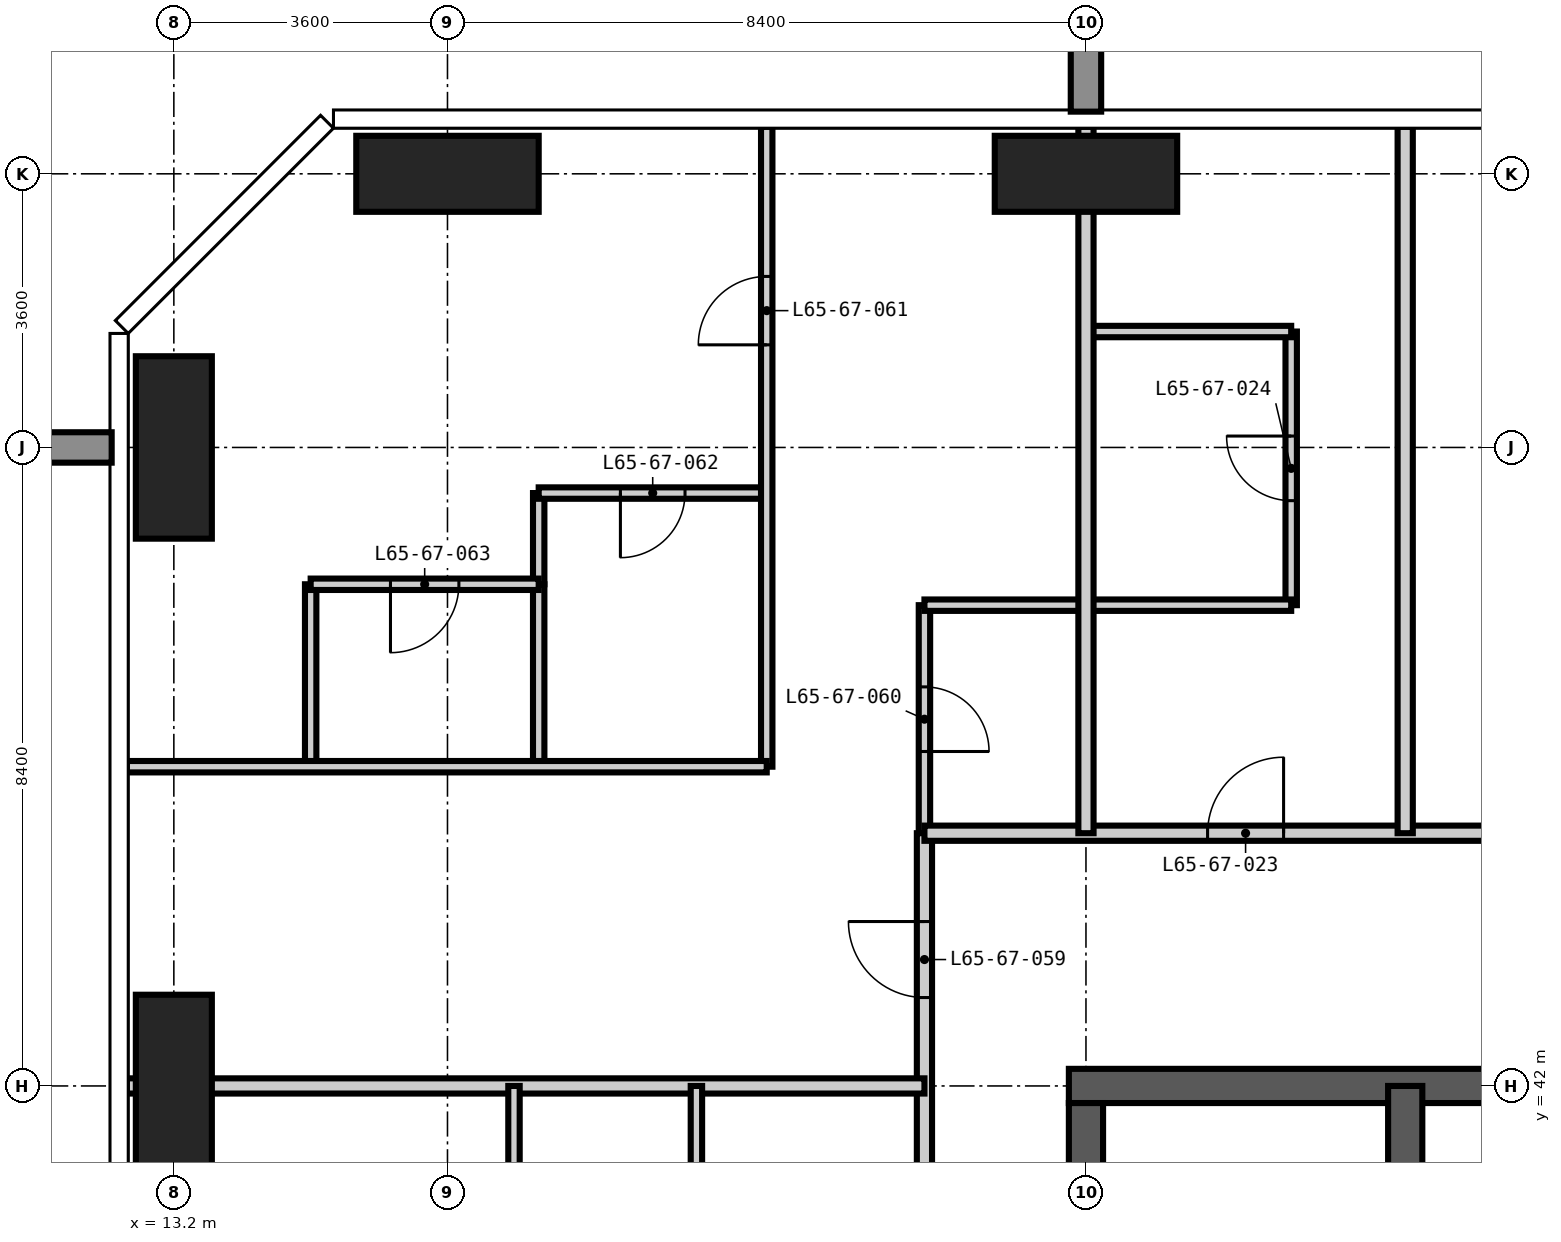
"""IFC4 building model, lengths in metres.
Left out: names, types, materials, properties, quantities, classifications, styles, units other than length and angle.
Written with IfcOpenShell. Run it as: python <this file> out.ifc"""

import sys

from ifc_helpers import new_model, si_unit, direction, frame, frame_2d, origin, origin_2d, place, context, subcontext, project, spatial, rectangle, extrude, element, fill, save


model = new_model("IFC4")
c1 = context("Model", 3, precision=1e-05, world=origin(), true_north=direction((0.0, 1.0)))
c2 = subcontext(c1, "Body", "Model", "MODEL_VIEW")
j1 = project(units=[si_unit("LENGTHUNIT", "METRE"), si_unit("PLANEANGLEUNIT", "RADIAN")], contexts=[c1])
p1 = place(None, origin())
s1 = spatial("IfcSite", under=j1, at=p1, CompositionType="ELEMENT")
p2 = place(p1, origin())
s2 = spatial("IfcBuilding", under=s1, at=p2, CompositionType="ELEMENT")
p3 = place(p2, frame((0.0, 0.0, 252.9)))
s3 = spatial("IfcBuildingStorey", under=s2, at=p3, CompositionType="ELEMENT", Elevation=252.9)
for number, where, z_axis, x_axis in (
    (1, (13.2, 42.0, -0.35), (0.0, 0.0, 1.0), (1.0, 0.0, 0.0)),
    (2, (13.2, 50.4, -0.35), (0.0, 0.0, 1.0), (1.0, 0.0, 0.0)),
):
    element("IfcColumn", number, at=place(p3, frame(where, z_axis=z_axis, x_axis=x_axis)), inside=s3, PredefinedType="COLUMN", context=c2, shape_type="SweptSolid", body=[
        extrude(rectangle(XDim=1.0, YDim=2.4, at=origin_2d()), origin(), (0.0, 0.0, 1.0), 3.9),
    ])
for number, where, z_axis, x_axis in (
    (3, (16.8, 54.0, -0.35), (0.0, 0.0, 1.0), (1.0, 0.0, 0.0)),
    (4, (25.2, 54.0, -0.35), (0.0, 0.0, 1.0), (1.0, 0.0, 0.0)),
):
    element("IfcColumn", number, at=place(p3, frame(where, z_axis=z_axis, x_axis=x_axis)), inside=s3, PredefinedType="COLUMN", context=c2, shape_type="SweptSolid", body=[
        extrude(rectangle(XDim=2.4, YDim=1.0, at=origin_2d()), origin(), (0.0, 0.0, 1.0), 3.9),
    ])
p4 = place(p3, frame((42.225, 42.0, -0.35), z_axis=(0.0, 0.0, 1.0), x_axis=(-1.0, 0.0, 0.0)))
e5 = element("IfcWall", 5, at=p4, inside=s3, PredefinedType="SHEAR", context=c2, shape_type="SweptSolid", body=[
    extrude(rectangle(XDim=17.25, YDim=0.45, at=frame_2d((8.625, 0.0))), origin(), (0.0, 0.0, 1.0), 3.9),
])
p5 = place(p4, frame((10.125, 0.0, 0.35)))
e6 = element("IfcOpeningElement", 6, at=p5, cuts=e5, PredefinedType="OPENING", context=c2, shape_type="SweptSolid", body=[
    extrude(rectangle(XDim=1.2, YDim=2.2, at=frame_2d((0.6, 1.1))), frame((0.0, 0.235, 0.0), z_axis=(0.0, -1.0, 0.0), x_axis=(1.0, 0.0, 0.0)), (0.0, 0.0, 1.0), 0.47),
])
p6 = place(p3, frame((25.2, 41.775, -0.35), z_axis=(0.0, 0.0, 1.0), x_axis=(0.0, -1.0, 0.0)))
e7 = element("IfcWall", 7, at=p6, inside=s3, PredefinedType="SHEAR", context=c2, shape_type="SweptSolid", body=[
    extrude(rectangle(XDim=24.75, YDim=0.45, at=frame_2d((12.375, 0.0))), origin(), (0.0, 0.0, 1.0), 3.9),
])
p7 = place(p6, frame((11.875, 0.0, 0.35)))
e8 = element("IfcOpeningElement", 8, at=p7, cuts=e7, PredefinedType="OPENING", context=c2, shape_type="SweptSolid", body=[
    extrude(rectangle(XDim=1.0, YDim=2.1, at=frame_2d((0.5, 1.05))), frame((0.0, 0.235, 0.0), z_axis=(0.0, -1.0, 0.0), x_axis=(1.0, 0.0, 0.0)), (0.0, 0.0, 1.0), 0.47),
])
p8 = place(p3, frame((29.4, 33.6, -0.35), z_axis=(0.0, 0.0, 1.0), x_axis=(0.0, 1.0, 0.0)))
e9 = element("IfcWall", 9, at=p8, inside=s3, PredefinedType="SHEAR", context=c2, shape_type="SweptSolid", body=[
    extrude(rectangle(XDim=8.4, YDim=0.45, at=frame_2d((4.2, 0.0))), origin(), (0.0, 0.0, 1.0), 3.9),
])
p9 = place(p8, frame((0.525, 0.0, 0.35)))
e10 = element("IfcOpeningElement", 10, at=p9, cuts=e9, PredefinedType="OPENING", context=c2, shape_type="SweptSolid", body=[
    extrude(rectangle(XDim=1.2, YDim=2.2, at=frame_2d((0.6, 1.1))), frame((0.0, 0.235, 0.0), z_axis=(0.0, -1.0, 0.0), x_axis=(1.0, 0.0, 0.0)), (0.0, 0.0, 1.0), 0.47),
])
p10 = place(p3, frame((18.0, 48.6, 0.0), z_axis=(0.0, 0.0, 1.0), x_axis=(0.0, 1.0, 0.0)))
e11 = element("IfcWall", 11, at=p10, inside=s3, PredefinedType="PARTITIONING", context=c2, shape_type="SweptSolid", body=[
    extrude(rectangle(XDim=1.2, YDim=0.15, at=frame_2d((0.6, 0.0))), origin(), (0.0, 0.0, 1.0), 3.55),
])
p11 = place(p3, frame((23.075, 45.325, 0.0), z_axis=(0.0, 0.0, 1.0), x_axis=(0.0, 1.0, 0.0)))
e12 = element("IfcWall", 12, at=p11, inside=s3, PredefinedType="PARTITIONING", context=c2, shape_type="SweptSolid", body=[
    extrude(rectangle(XDim=3.0, YDim=0.15, at=frame_2d((1.5, 0.0))), origin(), (0.0, 0.0, 1.0), 3.55),
])
p12 = place(p11, frame((1.075, 0.0, 0.0)))
e13 = element("IfcOpeningElement", 13, at=p12, cuts=e12, PredefinedType="OPENING", context=c2, shape_type="SweptSolid", body=[
    extrude(rectangle(XDim=0.85, YDim=2.1, at=frame_2d((0.425, 1.05))), frame((0.0, 0.085, 0.0), z_axis=(0.0, -1.0, 0.0), x_axis=(1.0, 0.0, 0.0)), (0.0, 0.0, 1.0), 0.17),
])
p13 = place(p3, frame((27.9, 48.325, 0.0), z_axis=(0.0, 0.0, 1.0), x_axis=(0.0, 1.0, 0.0)))
e14 = element("IfcWall", 14, at=p13, inside=s3, PredefinedType="PARTITIONING", context=c2, shape_type="SweptSolid", body=[
    extrude(rectangle(XDim=3.6, YDim=0.15, at=frame_2d((1.8, 0.0))), origin(), (0.0, 0.0, 1.0), 3.55),
])
p14 = place(p13, frame((1.375, 0.0, 0.0)))
e15 = element("IfcOpeningElement", 15, at=p14, cuts=e14, PredefinedType="OPENING", context=c2, shape_type="SweptSolid", body=[
    extrude(rectangle(XDim=0.85, YDim=2.1, at=frame_2d((0.425, 1.05))), frame((0.0, 0.085, 0.0), z_axis=(0.0, -1.0, 0.0), x_axis=(1.0, 0.0, 0.0)), (0.0, 0.0, 1.0), 0.17),
])
p15 = place(p3, frame((23.075, 48.325, 0.0), z_axis=(0.0, 0.0, 1.0), x_axis=(1.0, 0.0, 0.0)))
e16 = element("IfcWall", 16, at=p15, inside=s3, PredefinedType="PARTITIONING", context=c2, shape_type="SweptSolid", body=[
    extrude(rectangle(XDim=4.825, YDim=0.15, at=frame_2d((2.413, 0.0))), origin(), (0.0, 0.0, 1.0), 3.55),
])
p16 = place(p3, frame((18.0, 49.8, 0.0), z_axis=(0.0, 0.0, 1.0), x_axis=(1.0, 0.0, 0.0)))
e17 = element("IfcWall", 17, at=p16, inside=s3, PredefinedType="PARTITIONING", context=c2, shape_type="SweptSolid", body=[
    extrude(rectangle(XDim=3.0, YDim=0.15, at=frame_2d((1.5, 0.0))), origin(), (0.0, 0.0, 1.0), 3.55),
])
p17 = place(p16, frame((1.075, 0.0, 0.0)))
e18 = element("IfcOpeningElement", 18, at=p17, cuts=e17, PredefinedType="OPENING", context=c2, shape_type="SweptSolid", body=[
    extrude(rectangle(XDim=0.85, YDim=2.1, at=frame_2d((0.425, 1.05))), frame((0.0, 0.085, 0.0), z_axis=(0.0, -1.0, 0.0), x_axis=(1.0, 0.0, 0.0)), (0.0, 0.0, 1.0), 0.17),
])
p18 = place(p3, frame((25.2, 51.925, 0.0), z_axis=(0.0, 0.0, 1.0), x_axis=(1.0, 0.0, 0.0)))
e19 = element("IfcWall", 19, at=p18, inside=s3, PredefinedType="PARTITIONING", context=c2, shape_type="SweptSolid", body=[
    extrude(rectangle(XDim=2.7, YDim=0.15, at=frame_2d((1.35, 0.0))), origin(), (0.0, 0.0, 1.0), 3.55),
])
p19 = place(p3, frame((23.075, 14.675, 0.0), z_axis=(0.0, 0.0, 1.0), x_axis=(0.0, 1.0, 0.0)))
e20 = element("IfcWall", 20, at=p19, inside=s3, PredefinedType="PARTITIONING", context=c2, shape_type="SweptSolid", body=[
    extrude(rectangle(XDim=30.65, YDim=0.2, at=frame_2d((15.325, 0.0))), origin(), (0.0, 0.0, 1.0), 3.55),
])
p20 = place(p19, frame((4.925, 0.0, 0.0)))
e21 = element("IfcOpeningElement", 21, at=p20, cuts=e20, PredefinedType="OPENING", context=c2, shape_type="SweptSolid", body=[
    extrude(rectangle(XDim=1.0, YDim=2.2, at=frame_2d((0.5, 1.1))), frame((0.0, 0.11, 0.0), z_axis=(0.0, -1.0, 0.0), x_axis=(1.0, 0.0, 0.0)), (0.0, 0.0, 1.0), 0.22),
])
p21 = place(p19, frame((15.125, 0.0, 0.0)))
e22 = element("IfcOpeningElement", 22, at=p21, cuts=e20, PredefinedType="OPENING", context=c2, shape_type="SweptSolid", body=[
    extrude(rectangle(XDim=1.0, YDim=2.2, at=frame_2d((0.5, 1.1))), frame((0.0, 0.11, 0.0), z_axis=(0.0, -1.0, 0.0), x_axis=(1.0, 0.0, 0.0)), (0.0, 0.0, 1.0), 0.22),
])
p22 = place(p19, frame((21.725, 0.0, 0.0)))
e23 = element("IfcOpeningElement", 23, at=p22, cuts=e20, PredefinedType="OPENING", context=c2, shape_type="SweptSolid", body=[
    extrude(rectangle(XDim=1.0, YDim=2.2, at=frame_2d((0.5, 1.1))), frame((0.0, 0.11, 0.0), z_axis=(0.0, -1.0, 0.0), x_axis=(1.0, 0.0, 0.0)), (0.0, 0.0, 1.0), 0.22),
])
p23 = place(p19, frame((0.563, 0.0, 0.0)))
e24 = element("IfcOpeningElement", 24, at=p23, cuts=e20, PredefinedType="OPENING", context=c2, shape_type="SweptSolid", body=[
    extrude(rectangle(XDim=1.0, YDim=2.2, at=frame_2d((0.5, 1.1))), frame((0.0, 0.11, 0.0), z_axis=(0.0, -1.0, 0.0), x_axis=(1.0, 0.0, 0.0)), (0.0, 0.0, 1.0), 0.22),
])
p24 = place(p19, frame((28.488, 0.0, 0.0)))
e25 = element("IfcOpeningElement", 25, at=p24, cuts=e20, PredefinedType="OPENING", context=c2, shape_type="SweptSolid", body=[
    extrude(rectangle(XDim=1.0, YDim=2.2, at=frame_2d((0.5, 1.1))), frame((0.0, 0.11, 0.0), z_axis=(0.0, -1.0, 0.0), x_axis=(1.0, 0.0, 0.0)), (0.0, 0.0, 1.0), 0.22),
])
p25 = place(p3, frame((23.075, 45.325, 0.0), z_axis=(0.0, 0.0, 1.0), x_axis=(1.0, 0.0, 0.0)))
e26 = element("IfcWall", 26, at=p25, inside=s3, PredefinedType="PARTITIONING", context=c2, shape_type="SweptSolid", body=[
    extrude(rectangle(XDim=21.65, YDim=0.2, at=frame_2d((10.825, 0.0))), origin(), (0.0, 0.0, 1.0), 3.55),
])
p26 = place(p25, frame((3.725, 0.0, 0.0)))
e27 = element("IfcOpeningElement", 27, at=p26, cuts=e26, PredefinedType="OPENING", context=c2, shape_type="SweptSolid", body=[
    extrude(rectangle(XDim=1.0, YDim=2.2, at=frame_2d((0.5, 1.1))), frame((0.0, 0.11, 0.0), z_axis=(0.0, -1.0, 0.0), x_axis=(1.0, 0.0, 0.0)), (0.0, 0.0, 1.0), 0.22),
])
p27 = place(p25, frame((10.025, 0.0, 0.0)))
e28 = element("IfcOpeningElement", 28, at=p27, cuts=e26, PredefinedType="OPENING", context=c2, shape_type="SweptSolid", body=[
    extrude(rectangle(XDim=1.0, YDim=2.2, at=frame_2d((0.5, 1.1))), frame((0.0, 0.11, 0.0), z_axis=(0.0, -1.0, 0.0), x_axis=(1.0, 0.0, 0.0)), (0.0, 0.0, 1.0), 0.22),
])
p28 = place(p25, frame((16.325, 0.0, 0.0)))
e29 = element("IfcOpeningElement", 29, at=p28, cuts=e26, PredefinedType="OPENING", context=c2, shape_type="SweptSolid", body=[
    extrude(rectangle(XDim=1.0, YDim=2.2, at=frame_2d((0.5, 1.1))), frame((0.0, 0.11, 0.0), z_axis=(0.0, -1.0, 0.0), x_axis=(1.0, 0.0, 0.0)), (0.0, 0.0, 1.0), 0.22),
])
for number, where, z_axis, x_axis in (
    (30, (25.2, 45.325, 0.0), (0.0, 0.0, 1.0), (0.0, 1.0, 0.0)),
    (31, (29.4, 45.325, 0.0), (0.0, 0.0, 1.0), (0.0, 1.0, 0.0)),
):
    element("IfcWall", number, at=place(p3, frame(where, z_axis=z_axis, x_axis=x_axis)), inside=s3, PredefinedType="PARTITIONING", context=c2, shape_type="SweptSolid", body=[
        extrude(rectangle(XDim=9.293, YDim=0.2, at=frame_2d((4.646, 0.0))), origin(), (0.0, 0.0, 1.0), 3.55),
    ])
p29 = place(p3, frame((12.582, 42.0, 0.0), z_axis=(0.0, 0.0, 1.0), x_axis=(1.0, 0.0, 0.0)))
e32 = element("IfcWall", 32, at=p29, inside=s3, PredefinedType="PARTITIONING", context=c2, shape_type="SweptSolid", body=[
    extrude(rectangle(XDim=10.493, YDim=0.2, at=frame_2d((5.247, 0.0))), origin(), (0.0, 0.0, 1.0), 3.55),
])
p30 = place(p3, frame((15.0, 46.2, 0.0), z_axis=(0.0, 0.0, 1.0), x_axis=(0.0, 1.0, 0.0)))
e33 = element("IfcWall", 33, at=p30, inside=s3, PredefinedType="PARTITIONING", context=c2, shape_type="SweptSolid", body=[
    extrude(rectangle(XDim=2.4, YDim=0.15, at=frame_2d((1.2, 0.0))), origin(), (0.0, 0.0, 1.0), 3.55),
])
p31 = place(p3, frame((17.675, 37.8, 0.0), z_axis=(0.0, 0.0, 1.0), x_axis=(0.0, 1.0, 0.0)))
e34 = element("IfcWall", 34, at=p31, inside=s3, PredefinedType="PARTITIONING", context=c2, shape_type="SweptSolid", body=[
    extrude(rectangle(XDim=4.2, YDim=0.15, at=frame_2d((2.1, 0.0))), origin(), (0.0, 0.0, 1.0), 3.55),
])
p32 = place(p31, frame((1.65, 0.0, 0.0)))
e35 = element("IfcOpeningElement", 35, at=p32, cuts=e34, PredefinedType="OPENING", context=c2, shape_type="SweptSolid", body=[
    extrude(rectangle(XDim=0.9, YDim=2.1, at=frame_2d((0.45, 1.05))), frame((0.0, 0.085, 0.0), z_axis=(0.0, -1.0, 0.0), x_axis=(1.0, 0.0, 0.0)), (0.0, 0.0, 1.0), 0.17),
])
p33 = place(p3, frame((18.0, 46.2, 0.0), z_axis=(0.0, 0.0, 1.0), x_axis=(0.0, 1.0, 0.0)))
e36 = element("IfcWall", 36, at=p33, inside=s3, PredefinedType="PARTITIONING", context=c2, shape_type="SweptSolid", body=[
    extrude(rectangle(XDim=2.4, YDim=0.15, at=frame_2d((1.2, 0.0))), origin(), (0.0, 0.0, 1.0), 3.55),
])
p34 = place(p3, frame((20.075, 37.8, 0.0), z_axis=(0.0, 0.0, 1.0), x_axis=(0.0, 1.0, 0.0)))
e37 = element("IfcWall", 37, at=p34, inside=s3, PredefinedType="PARTITIONING", context=c2, shape_type="SweptSolid", body=[
    extrude(rectangle(XDim=4.2, YDim=0.15, at=frame_2d((2.1, 0.0))), origin(), (0.0, 0.0, 1.0), 3.55),
])
p35 = place(p3, frame((21.0, 46.2, 0.0), z_axis=(0.0, 0.0, 1.0), x_axis=(0.0, 1.0, 0.0)))
e38 = element("IfcWall", 38, at=p35, inside=s3, PredefinedType="PARTITIONING", context=c2, shape_type="SweptSolid", body=[
    extrude(rectangle(XDim=8.418, YDim=0.15, at=frame_2d((4.209, 0.0))), origin(), (0.0, 0.0, 1.0), 3.55),
])
p36 = place(p35, frame((5.55, 0.0, 0.0)))
e39 = element("IfcOpeningElement", 39, at=p36, cuts=e38, PredefinedType="OPENING", context=c2, shape_type="SweptSolid", body=[
    extrude(rectangle(XDim=0.9, YDim=2.1, at=frame_2d((0.45, 1.05))), frame((0.0, 0.085, 0.0), z_axis=(0.0, -1.0, 0.0), x_axis=(1.0, 0.0, 0.0)), (0.0, 0.0, 1.0), 0.17),
])
p37 = place(p3, frame((12.582, 46.2, 0.0), z_axis=(0.0, 0.0, 1.0), x_axis=(1.0, 0.0, 0.0)))
e40 = element("IfcWall", 40, at=p37, inside=s3, PredefinedType="PARTITIONING", context=c2, shape_type="SweptSolid", body=[
    extrude(rectangle(XDim=8.418, YDim=0.15, at=frame_2d((4.209, 0.0))), origin(), (0.0, 0.0, 1.0), 3.55),
])
p38 = place(p3, frame((15.0, 48.6, 0.0), z_axis=(0.0, 0.0, 1.0), x_axis=(1.0, 0.0, 0.0)))
e41 = element("IfcWall", 41, at=p38, inside=s3, PredefinedType="PARTITIONING", context=c2, shape_type="SweptSolid", body=[
    extrude(rectangle(XDim=3.0, YDim=0.15, at=frame_2d((1.5, 0.0))), origin(), (0.0, 0.0, 1.0), 3.55),
])
p39 = place(p38, frame((1.05, 0.0, 0.0)))
e42 = element("IfcOpeningElement", 42, at=p39, cuts=e41, PredefinedType="OPENING", context=c2, shape_type="SweptSolid", body=[
    extrude(rectangle(XDim=0.9, YDim=2.1, at=frame_2d((0.45, 1.05))), frame((0.0, 0.085, 0.0), z_axis=(0.0, -1.0, 0.0), x_axis=(1.0, 0.0, 0.0)), (0.0, 0.0, 1.0), 0.17),
])
p40 = place(p26, origin())
e43 = element("IfcDoor", 43, at=p40, inside=s3, OperationType="SINGLE_SWING_RIGHT", PredefinedType="DOOR", context=c2, shape_type="SweptSolid", body=[
    extrude(rectangle(XDim=1.0, YDim=2.2, at=frame_2d((0.5, 1.1))), frame((0.0, 0.025, 0.0), z_axis=(0.0, -1.0, 0.0), x_axis=(1.0, 0.0, 0.0)), (0.0, 0.0, 1.0), 0.05),
])
fill(e27, e43)
p41 = place(p14, origin())
e44 = element("IfcDoor", 44, at=p41, inside=s3, OperationType="SINGLE_SWING_RIGHT", PredefinedType="DOOR", context=c2, shape_type="SweptSolid", body=[
    extrude(rectangle(XDim=0.85, YDim=2.1, at=frame_2d((0.425, 1.05))), frame((0.0, 0.025, 0.0), z_axis=(0.0, -1.0, 0.0), x_axis=(1.0, 0.0, 0.0)), (0.0, 0.0, 1.0), 0.05),
])
fill(e15, e44)
p42 = place(p24, origin())
e45 = element("IfcDoor", 45, at=p42, inside=s3, OperationType="SINGLE_SWING_RIGHT", PredefinedType="DOOR", context=c2, shape_type="SweptSolid", body=[
    extrude(rectangle(XDim=1.0, YDim=2.2, at=frame_2d((0.5, 1.1))), frame((0.0, 0.025, 0.0), z_axis=(0.0, -1.0, 0.0), x_axis=(1.0, 0.0, 0.0)), (0.0, 0.0, 1.0), 0.05),
])
fill(e25, e45)
p43 = place(p12, frame((0.85, 0.0, 0.0), z_axis=(0.0, 0.0, 1.0), x_axis=(-1.0, 0.0, 0.0)))
e46 = element("IfcDoor", 46, at=p43, inside=s3, OperationType="SINGLE_SWING_RIGHT", PredefinedType="DOOR", context=c2, shape_type="SweptSolid", body=[
    extrude(rectangle(XDim=0.85, YDim=2.1, at=frame_2d((0.425, 1.05))), frame((0.0, 0.025, 0.0), z_axis=(0.0, -1.0, 0.0), x_axis=(1.0, 0.0, 0.0)), (0.0, 0.0, 1.0), 0.05),
])
fill(e13, e46)
p44 = place(p36, origin())
e47 = element("IfcDoor", 47, at=p44, inside=s3, OperationType="SINGLE_SWING_LEFT", PredefinedType="DOOR", context=c2, shape_type="SweptSolid", body=[
    extrude(rectangle(XDim=0.9, YDim=2.1, at=frame_2d((0.45, 1.05))), frame((0.0, 0.025, 0.0), z_axis=(0.0, -1.0, 0.0), x_axis=(1.0, 0.0, 0.0)), (0.0, 0.0, 1.0), 0.05),
])
fill(e39, e47)
p45 = place(p17, frame((0.85, 0.0, 0.0), z_axis=(0.0, 0.0, 1.0), x_axis=(-1.0, 0.0, 0.0)))
e48 = element("IfcDoor", 48, at=p45, inside=s3, OperationType="SINGLE_SWING_RIGHT", PredefinedType="DOOR", context=c2, shape_type="SweptSolid", body=[
    extrude(rectangle(XDim=0.85, YDim=2.1, at=frame_2d((0.425, 1.05))), frame((0.0, 0.025, 0.0), z_axis=(0.0, -1.0, 0.0), x_axis=(1.0, 0.0, 0.0)), (0.0, 0.0, 1.0), 0.05),
])
fill(e18, e48)
p46 = place(p39, frame((0.9, 0.0, 0.0), z_axis=(0.0, 0.0, 1.0), x_axis=(-1.0, 0.0, 0.0)))
e49 = element("IfcDoor", 49, at=p46, inside=s3, OperationType="SINGLE_SWING_RIGHT", PredefinedType="DOOR", context=c2, shape_type="SweptSolid", body=[
    extrude(rectangle(XDim=0.9, YDim=2.1, at=frame_2d((0.45, 1.05))), frame((0.0, 0.025, 0.0), z_axis=(0.0, -1.0, 0.0), x_axis=(1.0, 0.0, 0.0)), (0.0, 0.0, 1.0), 0.05),
])
fill(e42, e49)
save(model, sys.argv[1])
